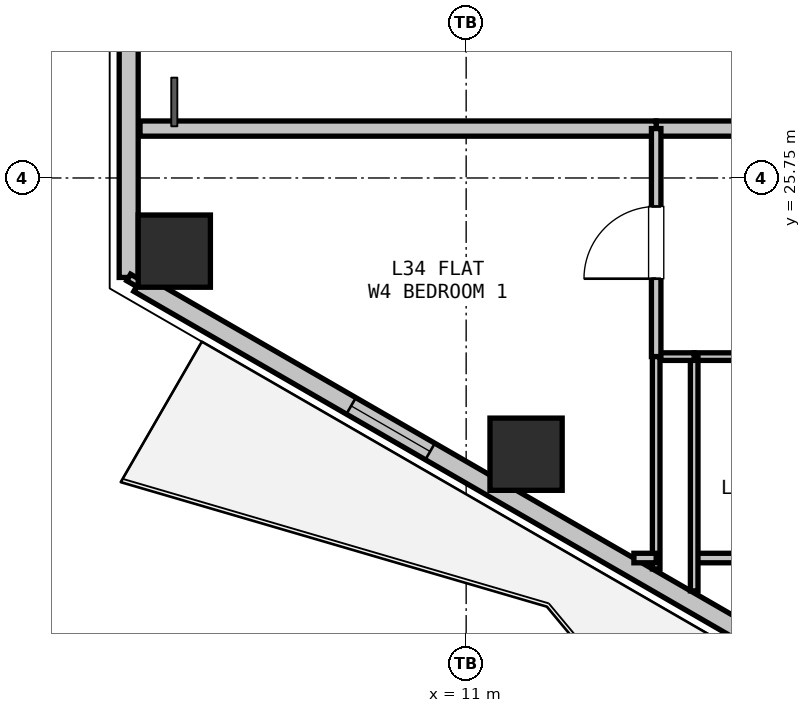
"""IFC4 building model, lengths in metres.
Left out: names, types, materials, properties, quantities, classifications, styles, units other than length and angle.
Written with IfcOpenShell. Run it as: python <this file> out.ifc"""

import sys

from ifc_helpers import new_model, si_unit, direction, frame, frame_2d, origin, origin_2d, place, context, subcontext, project, spatial, rectangle, hollow_rectangle, extrude, element, fill, save


model = new_model("IFC4")
c1 = context("Model", 3, precision=1e-05, world=origin(), true_north=direction((0.0, 1.0)))
c2 = subcontext(c1, "Body", "Model", "MODEL_VIEW")
j1 = project(units=[si_unit("LENGTHUNIT", "METRE"), si_unit("PLANEANGLEUNIT", "RADIAN")], contexts=[c1])
p1 = place(None, origin())
s1 = spatial("IfcSite", under=j1, at=p1, CompositionType="ELEMENT")
p2 = place(p1, origin())
s2 = spatial("IfcBuilding", under=s1, at=p2, CompositionType="ELEMENT")
p3 = place(p2, frame((0.0, 0.0, 124.5)))
s3 = spatial("IfcBuildingStorey", under=s2, at=p3, CompositionType="ELEMENT", Elevation=124.5)
for number, where, z_axis, x_axis in (
    (1, (11.788, 22.116, 0.0), (0.0, 0.0, 1.0), (1.0, 0.0, 0.0)),
    (2, (7.16, 24.788, 0.0), (0.0, 0.0, 1.0), (1.0, 0.0, 0.0)),
):
    element("IfcColumn", number, at=place(p3, frame(where, z_axis=z_axis, x_axis=x_axis)), inside=s3, PredefinedType="COLUMN", context=c2, shape_type="SweptSolid", body=[
        extrude(hollow_rectangle(XDim=0.95, YDim=0.95, WallThickness=0.028, at=origin_2d()), origin(), (0.0, 0.0, 1.0), 3.3),
    ])
p4 = place(p3, frame((6.56, 24.441, 0.0), z_axis=(0.0, 0.0, 1.0), x_axis=(0.0, 1.0, 0.0)))
e3 = element("IfcWall", 3, at=p4, inside=s3, PredefinedType="SOLIDWALL", context=c2, shape_type="SweptSolid", body=[
    extrude(rectangle(XDim=4.617, YDim=0.25, at=frame_2d((2.309, 0.0))), origin(), (0.0, 0.0, 1.0), 2.68),
])
p5 = place(p3, frame((16.378, 18.773, 0.0), z_axis=(0.0, 0.0, 1.0), x_axis=(-0.866027848477, 0.499995765644, 0.0)))
e4 = element("IfcWall", 4, at=p5, inside=s3, PredefinedType="SOLIDWALL", context=c2, shape_type="SweptSolid", body=[
    extrude(rectangle(XDim=11.186, YDim=0.25, at=frame_2d((5.593, 0.0))), origin(), (0.0, 0.0, 1.0), 2.68),
])
p6 = place(p5, frame((6.757, 0.0, 0.9)))
e5 = element("IfcOpeningElement", 5, at=p6, cuts=e4, PredefinedType="OPENING", context=c2, shape_type="SweptSolid", body=[
    extrude(rectangle(XDim=1.2, YDim=1.4, at=frame_2d((0.6, 0.7))), frame((0.0, 0.135, 0.0), z_axis=(0.0, -1.0, 0.0), x_axis=(1.0, 0.0, 0.0)), (0.0, 0.0, 1.0), 0.27),
])
p7 = place(p3, frame((14.0, 23.4, 0.0), z_axis=(0.0, 0.0, 1.0), x_axis=(1.0, 0.0, 0.0)))
e6 = element("IfcWall", 6, at=p7, inside=s3, PredefinedType="PARTITIONING", context=c2, shape_type="SweptSolid", body=[
    extrude(rectangle(XDim=3.0, YDim=0.1, at=frame_2d((1.5, 0.0))), origin(), (0.0, 0.0, 1.0), 3.06),
])
p8 = place(p7, frame((1.025, 0.0, 0.0)))
e7 = element("IfcOpeningElement", 7, at=p8, cuts=e6, PredefinedType="OPENING", context=c2, shape_type="SweptSolid", body=[
    extrude(rectangle(XDim=0.95, YDim=2.1, at=frame_2d((0.475, 1.05))), frame((0.0, 0.06, 0.0), z_axis=(0.0, -1.0, 0.0), x_axis=(1.0, 0.0, 0.0)), (0.0, 0.0, 1.0), 0.12),
])
p9 = place(p3, frame((17.0, 20.75, 0.0), z_axis=(0.0, 0.0, 1.0), x_axis=(-1.0, 0.0, 0.0)))
e8 = element("IfcWall", 8, at=p9, inside=s3, PredefinedType="PARTITIONING", context=c2, shape_type="SweptSolid", body=[
    extrude(rectangle(XDim=3.0, YDim=0.125, at=frame_2d((1.5, 0.0))), origin(), (0.0, 0.0, 1.0), 2.365),
])
p10 = place(p3, frame((14.0, 20.318, 0.0), z_axis=(0.0, 0.0, 1.0), x_axis=(0.0, 1.0, 0.0)))
e9 = element("IfcWall", 9, at=p10, inside=s3, PredefinedType="PARTITIONING", context=c2, shape_type="SweptSolid", body=[
    extrude(rectangle(XDim=3.082, YDim=0.1, at=frame_2d((1.541, 0.0))), origin(), (0.0, 0.0, 1.0), 2.365),
])
p11 = place(p3, frame((21.95, 26.4, 0.0), z_axis=(0.0, 0.0, 1.0), x_axis=(-1.0, 0.0, 0.0)))
e10 = element("IfcWall", 10, at=p11, inside=s3, PredefinedType="PARTITIONING", context=c2, shape_type="SweptSolid", body=[
    extrude(rectangle(XDim=8.45, YDim=0.2, at=frame_2d((4.225, 0.0))), origin(), (0.0, 0.0, 1.0), 2.508),
])
p12 = place(p3, frame((13.5, 26.4, 0.0), z_axis=(0.0, 0.0, 1.0), x_axis=(-1.0, 0.0, 0.0)))
e11 = element("IfcWall", 11, at=p12, inside=s3, PredefinedType="PARTITIONING", context=c2, shape_type="SweptSolid", body=[
    extrude(rectangle(XDim=6.791, YDim=0.2, at=frame_2d((3.396, 0.0))), origin(), (0.0, 0.0, 1.0), 2.725),
])
p13 = place(p3, frame((14.0, 23.4, 0.0), z_axis=(0.0, 0.0, 1.0), x_axis=(-1.0, 0.0, 0.0)))
e12 = element("IfcWall", 12, at=p13, inside=s3, PredefinedType="PARTITIONING", context=c2, shape_type="SweptSolid", body=[
    extrude(rectangle(XDim=0.5, YDim=0.1, at=frame_2d((0.25, 0.0))), origin(), (0.0, 0.0, 1.0), 3.06),
])
p14 = place(p3, frame((13.5, 23.4, 0.0), z_axis=(0.0, 0.0, 1.0), x_axis=(0.0, 1.0, 0.0)))
e13 = element("IfcWall", 13, at=p14, inside=s3, PredefinedType="PARTITIONING", context=c2, shape_type="SweptSolid", body=[
    extrude(rectangle(XDim=3.0, YDim=0.125, at=frame_2d((1.5, 0.0))), origin(), (0.0, 0.0, 1.0), 3.06),
])
p15 = place(p14, frame((1.025, 0.0, 0.0)))
e14 = element("IfcOpeningElement", 14, at=p15, cuts=e13, PredefinedType="OPENING", context=c2, shape_type="SweptSolid", body=[
    extrude(rectangle(XDim=0.95, YDim=2.1, at=frame_2d((0.475, 1.05))), frame((0.0, 0.073, 0.0), z_axis=(0.0, -1.0, 0.0), x_axis=(1.0, 0.0, 0.0)), (0.0, 0.0, 1.0), 0.145),
])
p16 = place(p3, frame((13.5, 23.4, 0.0), z_axis=(0.0, 0.0, 1.0), x_axis=(0.0, -1.0, 0.0)))
e15 = element("IfcWall", 15, at=p16, inside=s3, PredefinedType="PARTITIONING", context=c2, shape_type="SweptSolid", body=[
    extrude(rectangle(XDim=2.793, YDim=0.1, at=frame_2d((1.396, 0.0))), origin(), (0.0, 0.0, 1.0), 2.365),
])
p17 = place(p3, frame((13.5, 20.75, 0.0), z_axis=(0.0, 0.0, 1.0), x_axis=(-1.0, 0.0, 0.0)))
e16 = element("IfcWall", 16, at=p17, inside=s3, PredefinedType="PARTITIONING", context=c2, shape_type="SweptSolid", body=[
    extrude(rectangle(XDim=0.293, YDim=0.125, at=frame_2d((0.146, 0.0))), origin(), (0.0, 0.0, 1.0), 3.06),
])
p18 = place(p3, frame((6.69, 24.366, 0.0), z_axis=(0.0, 0.0, 1.0), x_axis=(-0.866131372301, 0.499816412211, 0.0)))
e17 = element("IfcWall", 17, at=p18, inside=s3, PredefinedType="PARTITIONING", context=c2, shape_type="SweptSolid", body=[
    extrude(rectangle(XDim=0.15, YDim=0.1, at=frame_2d((0.075, 0.0))), origin(), (0.0, 0.0, 1.0), 3.06),
])
p19 = place(p6, origin())
e18 = element("IfcWindow", 18, at=p19, inside=s3, PartitioningType="SINGLE_PANEL", PredefinedType="WINDOW", context=c2, shape_type="SweptSolid", body=[
    extrude(rectangle(XDim=1.2, YDim=1.4, at=frame_2d((0.6, 0.7))), frame((0.0, 0.03, 0.0), z_axis=(0.0, -1.0, 0.0), x_axis=(1.0, 0.0, 0.0)), (0.0, 0.0, 1.0), 0.06),
])
fill(e5, e18)
p20 = place(p15, origin())
e19 = element("IfcDoor", 19, at=p20, inside=s3, OperationType="SINGLE_SWING_LEFT", PredefinedType="DOOR", context=c2, shape_type="SweptSolid", body=[
    extrude(rectangle(XDim=0.95, YDim=2.1, at=frame_2d((0.475, 1.05))), frame((0.0, 0.025, 0.0), z_axis=(0.0, -1.0, 0.0), x_axis=(1.0, 0.0, 0.0)), (0.0, 0.0, 1.0), 0.05),
])
fill(e14, e19)
save(model, sys.argv[1])
